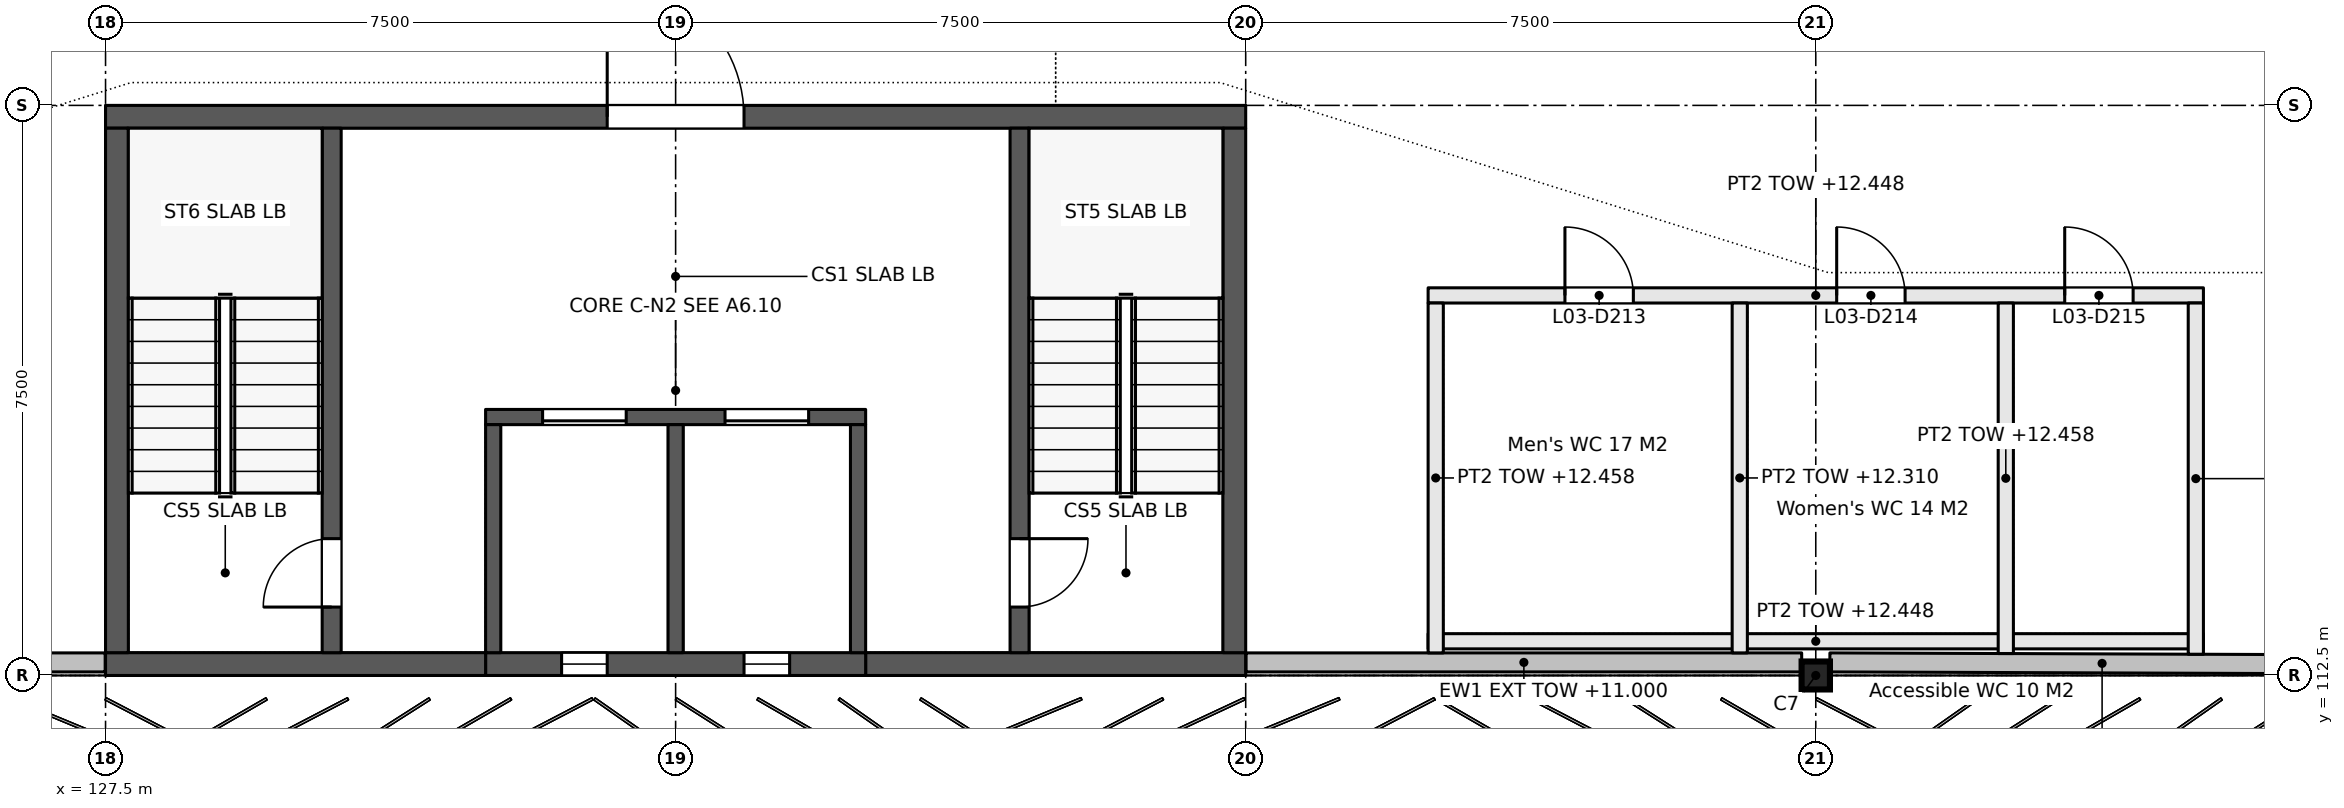
"""IFC4 building model, lengths in metres.
Left out: names, types, materials, properties, quantities, classifications, styles, units other than length and angle.
Written with IfcOpenShell. Run it as: python <this file> out.ifc"""

import sys

from ifc_helpers import new_model, si_unit, direction, frame, frame_2d, origin, origin_2d, place, context, subcontext, project, spatial, rectangle, i_section, extrude, element, fill, save


model = new_model("IFC4")
c1 = context("Model", 3, precision=1e-05, world=origin(), true_north=direction((0.0, 1.0)))
c2 = subcontext(c1, "Body", "Model", "MODEL_VIEW")
j1 = project(units=[si_unit("LENGTHUNIT", "METRE"), si_unit("PLANEANGLEUNIT", "RADIAN")], contexts=[c1])
p1 = place(None, origin())
s1 = spatial("IfcSite", under=j1, at=p1, CompositionType="ELEMENT")
p2 = place(p1, origin())
s2 = spatial("IfcBuilding", under=s1, at=p2, CompositionType="ELEMENT")
p3 = place(p2, frame((0.0, 0.0, 9.9)))
s3 = spatial("IfcBuildingStorey", under=s2, at=p3, CompositionType="ELEMENT", Elevation=9.9)
p4 = place(p3, frame((150.0, 112.5, 0.0), z_axis=(0.0, 0.0, 1.0), x_axis=(1.0, 0.0, 0.0)))
e1 = element("IfcColumn", 1, at=p4, inside=s3, PredefinedType="COLUMN", context=c2, shape_type="SweptSolid", body=[
    extrude(i_section(OverallWidth=0.373, OverallDepth=0.368, WebThickness=0.015, FlangeThickness=0.024, FilletRadius=0.015, at=origin_2d()), origin(), (0.0, 0.0, 1.0), 3.3),
])
p5 = place(p3, frame((144.9, 112.95, 0.0), z_axis=(0.0, 0.0, 1.0), x_axis=(1.0, 0.0, 0.0)))
e2 = element("IfcWall", 2, at=p5, inside=s3, PredefinedType="PARTITIONING", context=c2, shape_type="SweptSolid", body=[
    extrude(rectangle(XDim=10.2, YDim=0.2, at=frame_2d((5.1, 0.0))), origin(), (0.0, 0.0, 1.0), 2.548),
])
p6 = place(p3, frame((144.9, 117.5, 0.0), z_axis=(0.0, 0.0, 1.0), x_axis=(1.0, 0.0, 0.0)))
e3 = element("IfcWall", 3, at=p6, inside=s3, PredefinedType="PARTITIONING", context=c2, shape_type="SweptSolid", body=[
    extrude(rectangle(XDim=10.2, YDim=0.2, at=frame_2d((5.1, 0.0))), origin(), (0.0, 0.0, 1.0), 2.548),
])
p7 = place(p6, frame((1.8, 0.0, 0.0)))
e4 = element("IfcOpeningElement", 4, at=p7, cuts=e3, PredefinedType="OPENING", context=c2, shape_type="SweptSolid", body=[
    extrude(rectangle(XDim=0.9, YDim=2.1, at=frame_2d((0.45, 1.05))), frame((0.0, 0.11, 0.0), z_axis=(0.0, -1.0, 0.0), x_axis=(1.0, 0.0, 0.0)), (0.0, 0.0, 1.0), 0.22),
])
p8 = place(p6, frame((5.375, 0.0, 0.0)))
e5 = element("IfcOpeningElement", 5, at=p8, cuts=e3, PredefinedType="OPENING", context=c2, shape_type="SweptSolid", body=[
    extrude(rectangle(XDim=0.9, YDim=2.1, at=frame_2d((0.45, 1.05))), frame((0.0, 0.11, 0.0), z_axis=(0.0, -1.0, 0.0), x_axis=(1.0, 0.0, 0.0)), (0.0, 0.0, 1.0), 0.22),
])
p9 = place(p6, frame((8.375, 0.0, 0.0)))
e6 = element("IfcOpeningElement", 6, at=p9, cuts=e3, PredefinedType="OPENING", context=c2, shape_type="SweptSolid", body=[
    extrude(rectangle(XDim=0.9, YDim=2.1, at=frame_2d((0.45, 1.05))), frame((0.0, 0.11, 0.0), z_axis=(0.0, -1.0, 0.0), x_axis=(1.0, 0.0, 0.0)), (0.0, 0.0, 1.0), 0.22),
])
p10 = place(p3, frame((145.0, 112.797, 0.0), z_axis=(0.0, 0.0, 1.0), x_axis=(0.0, 1.0, 0.0)))
e7 = element("IfcWall", 7, at=p10, inside=s3, PredefinedType="PARTITIONING", context=c2, shape_type="SweptSolid", body=[
    extrude(rectangle(XDim=4.603, YDim=0.2, at=frame_2d((2.301, 0.0))), origin(), (0.0, 0.0, 1.0), 2.558),
])
p11 = place(p3, frame((149.0, 112.797, 0.0), z_axis=(0.0, 0.0, 1.0), x_axis=(0.0, 1.0, 0.0)))
e8 = element("IfcWall", 8, at=p11, inside=s3, PredefinedType="PARTITIONING", context=c2, shape_type="SweptSolid", body=[
    extrude(rectangle(XDim=4.603, YDim=0.2, at=frame_2d((2.301, 0.0))), origin(), (0.0, 0.0, 1.0), 2.41),
])
p12 = place(p3, frame((152.5, 112.789, 0.0), z_axis=(0.0, 0.0, 1.0), x_axis=(0.0, 1.0, 0.0)))
e9 = element("IfcWall", 9, at=p12, inside=s3, PredefinedType="PARTITIONING", context=c2, shape_type="SweptSolid", body=[
    extrude(rectangle(XDim=4.611, YDim=0.2, at=frame_2d((2.306, 0.0))), origin(), (0.0, 0.0, 1.0), 2.558),
])
p13 = place(p3, frame((155.0, 112.779, 0.0), z_axis=(0.0, 0.0, 1.0), x_axis=(0.0, 1.0, 0.0)))
e10 = element("IfcWall", 10, at=p13, inside=s3, PredefinedType="PARTITIONING", context=c2, shape_type="SweptSolid", body=[
    extrude(rectangle(XDim=4.621, YDim=0.2, at=frame_2d((2.31, 0.0))), origin(), (0.0, 0.0, 1.0), 2.558),
])
for number, where, z_axis, x_axis in (
    (11, (120.186, 112.672, 0.0), (0.0, 0.0, 1.0), (1.0, 0.0, 0.0)),
    (12, (142.505, 112.672, 0.0), (0.0, 0.0, 1.0), (1.0, 0.0, 0.0)),
):
    element("IfcWall", number, at=place(p3, frame(where, z_axis=z_axis, x_axis=x_axis)), inside=s3, PredefinedType="SOLIDWALL", context=c2, shape_type="SweptSolid", body=[
        extrude(rectangle(XDim=7.31, YDim=0.25, at=frame_2d((3.655, 0.0))), origin(), (0.0, 0.0, 1.0), 1.1),
    ])
p14 = place(p3, frame((150.186, 112.672, 0.0), z_axis=(0.0, 0.0, 1.0), x_axis=(0.999993224794, -0.003681082119, 0.0)))
e13 = element("IfcWall", 13, at=p14, inside=s3, PredefinedType="SOLIDWALL", context=c2, shape_type="SweptSolid", body=[
    extrude(rectangle(XDim=7.163, YDim=0.25, at=frame_2d((3.582, 0.0))), origin(), (0.0, 0.0, 1.0), 1.1),
])
p15 = place(p3, frame((127.5, 119.85, 0.0), z_axis=(0.0, 0.0, 1.0), x_axis=(1.0, 0.0, 0.0)))
e14 = element("IfcWall", 14, at=p15, inside=s3, PredefinedType="SHEAR", context=c2, shape_type="SweptSolid", body=[
    extrude(rectangle(XDim=15.0, YDim=0.3, at=frame_2d((7.5, 0.0))), origin(), (0.0, 0.0, 1.0), 3.3),
])
p16 = place(p15, frame((6.6, 0.0, 0.0)))
e15 = element("IfcOpeningElement", 15, at=p16, cuts=e14, PredefinedType="OPENING", context=c2, shape_type="SweptSolid", body=[
    extrude(rectangle(XDim=1.8, YDim=2.1, at=frame_2d((0.9, 1.05))), frame((0.0, 0.16, 0.0), z_axis=(0.0, -1.0, 0.0), x_axis=(1.0, 0.0, 0.0)), (0.0, 0.0, 1.0), 0.32),
])
p17 = place(p3, frame((142.5, 112.65, 0.0), z_axis=(0.0, 0.0, 1.0), x_axis=(-1.0, 0.0, 0.0)))
e16 = element("IfcWall", 16, at=p17, inside=s3, PredefinedType="SHEAR", context=c2, shape_type="SweptSolid", body=[
    extrude(rectangle(XDim=5.0, YDim=0.3, at=frame_2d((2.5, 0.0))), origin(), (0.0, 0.0, 1.0), 3.3),
])
p18 = place(p3, frame((137.5, 112.65, 0.0), z_axis=(0.0, 0.0, 1.0), x_axis=(-1.0, 0.0, 0.0)))
e17 = element("IfcWall", 17, at=p18, inside=s3, PredefinedType="SHEAR", context=c2, shape_type="SweptSolid", body=[
    extrude(rectangle(XDim=5.0, YDim=0.3, at=frame_2d((2.5, 0.0))), origin(), (0.0, 0.0, 1.0), 3.3),
])
p19 = place(p18, frame((1.0, 0.0, 0.3)))
e18 = element("IfcOpeningElement", 18, at=p19, cuts=e17, PredefinedType="OPENING", context=c2, shape_type="SweptSolid", body=[
    extrude(rectangle(XDim=0.6, YDim=2.7, at=frame_2d((0.3, 1.35))), frame((0.0, 0.16, 0.0), z_axis=(0.0, -1.0, 0.0), x_axis=(1.0, 0.0, 0.0)), (0.0, 0.0, 1.0), 0.32),
])
p20 = place(p18, frame((3.4, 0.0, 0.3)))
e19 = element("IfcOpeningElement", 19, at=p20, cuts=e17, PredefinedType="OPENING", context=c2, shape_type="SweptSolid", body=[
    extrude(rectangle(XDim=0.6, YDim=2.7, at=frame_2d((0.3, 1.35))), frame((0.0, 0.16, 0.0), z_axis=(0.0, -1.0, 0.0), x_axis=(1.0, 0.0, 0.0)), (0.0, 0.0, 1.0), 0.32),
])
p21 = place(p3, frame((132.5, 112.65, 0.0), z_axis=(0.0, 0.0, 1.0), x_axis=(-1.0, 0.0, 0.0)))
e20 = element("IfcWall", 20, at=p21, inside=s3, PredefinedType="SHEAR", context=c2, shape_type="SweptSolid", body=[
    extrude(rectangle(XDim=5.0, YDim=0.3, at=frame_2d((2.5, 0.0))), origin(), (0.0, 0.0, 1.0), 3.3),
])
for number, where, z_axis, x_axis in (
    (21, (142.35, 119.7, 0.0), (0.0, 0.0, 1.0), (0.0, -1.0, 0.0)),
    (22, (127.65, 119.7, 0.0), (0.0, 0.0, 1.0), (0.0, -1.0, 0.0)),
):
    element("IfcWall", number, at=place(p3, frame(where, z_axis=z_axis, x_axis=x_axis)), inside=s3, PredefinedType="SHEAR", context=c2, shape_type="SweptSolid", body=[
        extrude(rectangle(XDim=6.9, YDim=0.3, at=frame_2d((3.45, 0.0))), origin(), (0.0, 0.0, 1.0), 3.3),
    ])
p22 = place(p3, frame((139.525, 119.7, 0.0), z_axis=(0.0, 0.0, 1.0), x_axis=(0.0, -1.0, 0.0)))
e23 = element("IfcWall", 23, at=p22, inside=s3, PredefinedType="STANDARD", context=c2, shape_type="SweptSolid", body=[
    extrude(rectangle(XDim=6.9, YDim=0.25, at=frame_2d((3.45, 0.0))), origin(), (0.0, 0.0, 1.0), 3.1),
])
p23 = place(p22, frame((5.4, 0.0, 0.0)))
e24 = element("IfcOpeningElement", 24, at=p23, cuts=e23, PredefinedType="OPENING", context=c2, shape_type="SweptSolid", body=[
    extrude(rectangle(XDim=0.9, YDim=2.1, at=frame_2d((0.45, 1.05))), frame((0.0, 0.135, 0.0), z_axis=(0.0, -1.0, 0.0), x_axis=(1.0, 0.0, 0.0)), (0.0, 0.0, 1.0), 0.27),
])
p24 = place(p3, frame((130.475, 112.8, 0.0), z_axis=(0.0, 0.0, 1.0), x_axis=(0.0, 1.0, 0.0)))
e25 = element("IfcWall", 25, at=p24, inside=s3, PredefinedType="STANDARD", context=c2, shape_type="SweptSolid", body=[
    extrude(rectangle(XDim=6.9, YDim=0.25, at=frame_2d((3.45, 0.0))), origin(), (0.0, 0.0, 1.0), 3.1),
])
p25 = place(p24, frame((0.6, 0.0, 0.0)))
e26 = element("IfcOpeningElement", 26, at=p25, cuts=e25, PredefinedType="OPENING", context=c2, shape_type="SweptSolid", body=[
    extrude(rectangle(XDim=0.9, YDim=2.1, at=frame_2d((0.45, 1.05))), frame((0.0, 0.135, 0.0), z_axis=(0.0, -1.0, 0.0), x_axis=(1.0, 0.0, 0.0)), (0.0, 0.0, 1.0), 0.27),
])
p26 = place(p3, frame((137.5, 115.9, 0.0), z_axis=(0.0, 0.0, 1.0), x_axis=(-1.0, 0.0, 0.0)))
e27 = element("IfcWall", 27, at=p26, inside=s3, PredefinedType="STANDARD", context=c2, shape_type="SweptSolid", body=[
    extrude(rectangle(XDim=5.0, YDim=0.2, at=frame_2d((2.5, 0.0))), origin(), (0.0, 0.0, 1.0), 3.1),
])
p27 = place(p26, frame((0.75, 0.0, 0.0)))
e28 = element("IfcOpeningElement", 28, at=p27, cuts=e27, PredefinedType="OPENING", context=c2, shape_type="SweptSolid", body=[
    extrude(rectangle(XDim=1.1, YDim=2.1, at=frame_2d((0.55, 1.05))), frame((0.0, 0.11, 0.0), z_axis=(0.0, -1.0, 0.0), x_axis=(1.0, 0.0, 0.0)), (0.0, 0.0, 1.0), 0.22),
])
p28 = place(p26, frame((3.15, 0.0, 0.0)))
e29 = element("IfcOpeningElement", 29, at=p28, cuts=e27, PredefinedType="OPENING", context=c2, shape_type="SweptSolid", body=[
    extrude(rectangle(XDim=1.1, YDim=2.1, at=frame_2d((0.55, 1.05))), frame((0.0, 0.11, 0.0), z_axis=(0.0, -1.0, 0.0), x_axis=(1.0, 0.0, 0.0)), (0.0, 0.0, 1.0), 0.22),
])
for number, where, z_axis, x_axis in (
    (30, (137.4, 115.8, 0.0), (0.0, 0.0, 1.0), (0.0, -1.0, 0.0)),
    (31, (135.0, 115.8, 0.0), (0.0, 0.0, 1.0), (0.0, -1.0, 0.0)),
    (32, (132.6, 115.8, 0.0), (0.0, 0.0, 1.0), (0.0, -1.0, 0.0)),
):
    element("IfcWall", number, at=place(p3, frame(where, z_axis=z_axis, x_axis=x_axis)), inside=s3, PredefinedType="STANDARD", context=c2, shape_type="SweptSolid", body=[
        extrude(rectangle(XDim=3.0, YDim=0.2, at=frame_2d((1.5, 0.0))), origin(), (0.0, 0.0, 1.0), 3.1),
    ])
p29 = place(p7, origin())
e33 = element("IfcDoor", 33, at=p29, inside=s3, OperationType="SINGLE_SWING_LEFT", PredefinedType="DOOR", context=c2, shape_type="SweptSolid", body=[
    extrude(rectangle(XDim=0.9, YDim=2.1, at=frame_2d((0.45, 1.05))), frame((0.0, 0.025, 0.0), z_axis=(0.0, -1.0, 0.0), x_axis=(1.0, 0.0, 0.0)), (0.0, 0.0, 1.0), 0.05),
])
fill(e4, e33)
p30 = place(p8, origin())
e34 = element("IfcDoor", 34, at=p30, inside=s3, OperationType="SINGLE_SWING_RIGHT", PredefinedType="DOOR", context=c2, shape_type="SweptSolid", body=[
    extrude(rectangle(XDim=0.9, YDim=2.1, at=frame_2d((0.45, 1.05))), frame((0.0, 0.025, 0.0), z_axis=(0.0, -1.0, 0.0), x_axis=(1.0, 0.0, 0.0)), (0.0, 0.0, 1.0), 0.05),
])
fill(e5, e34)
p31 = place(p9, origin())
e35 = element("IfcDoor", 35, at=p31, inside=s3, OperationType="SINGLE_SWING_RIGHT", PredefinedType="DOOR", context=c2, shape_type="SweptSolid", body=[
    extrude(rectangle(XDim=0.9, YDim=2.1, at=frame_2d((0.45, 1.05))), frame((0.0, 0.025, 0.0), z_axis=(0.0, -1.0, 0.0), x_axis=(1.0, 0.0, 0.0)), (0.0, 0.0, 1.0), 0.05),
])
fill(e6, e35)
p32 = place(p16, origin())
e36 = element("IfcDoor", 36, at=p32, inside=s3, OperationType="DOUBLE_DOOR_SINGLE_SWING", PredefinedType="DOOR", context=c2, shape_type="SweptSolid", body=[
    extrude(rectangle(XDim=1.8, YDim=2.1, at=frame_2d((0.9, 1.05))), frame((0.0, 0.025, 0.0), z_axis=(0.0, -1.0, 0.0), x_axis=(1.0, 0.0, 0.0)), (0.0, 0.0, 1.0), 0.05),
])
fill(e15, e36)
p33 = place(p23, origin())
e37 = element("IfcDoor", 37, at=p33, inside=s3, OperationType="SINGLE_SWING_LEFT", PredefinedType="DOOR", context=c2, shape_type="SweptSolid", body=[
    extrude(rectangle(XDim=0.9, YDim=2.1, at=frame_2d((0.45, 1.05))), frame((0.0, 0.025, 0.0), z_axis=(0.0, -1.0, 0.0), x_axis=(1.0, 0.0, 0.0)), (0.0, 0.0, 1.0), 0.05),
])
fill(e24, e37)
p34 = place(p25, origin())
e38 = element("IfcDoor", 38, at=p34, inside=s3, OperationType="SINGLE_SWING_RIGHT", PredefinedType="DOOR", context=c2, shape_type="SweptSolid", body=[
    extrude(rectangle(XDim=0.9, YDim=2.1, at=frame_2d((0.45, 1.05))), frame((0.0, 0.025, 0.0), z_axis=(0.0, -1.0, 0.0), x_axis=(1.0, 0.0, 0.0)), (0.0, 0.0, 1.0), 0.05),
])
fill(e26, e38)
p35 = place(p27, origin())
e39 = element("IfcDoor", 39, at=p35, inside=s3, OperationType="DOUBLE_DOOR_SLIDING", PredefinedType="DOOR", context=c2, shape_type="SweptSolid", body=[
    extrude(rectangle(XDim=1.1, YDim=2.1, at=frame_2d((0.55, 1.05))), frame((0.0, 0.025, 0.0), z_axis=(0.0, -1.0, 0.0), x_axis=(1.0, 0.0, 0.0)), (0.0, 0.0, 1.0), 0.05),
])
fill(e28, e39)
p36 = place(p28, origin())
e40 = element("IfcDoor", 40, at=p36, inside=s3, OperationType="DOUBLE_DOOR_SLIDING", PredefinedType="DOOR", context=c2, shape_type="SweptSolid", body=[
    extrude(rectangle(XDim=1.1, YDim=2.1, at=frame_2d((0.55, 1.05))), frame((0.0, 0.025, 0.0), z_axis=(0.0, -1.0, 0.0), x_axis=(1.0, 0.0, 0.0)), (0.0, 0.0, 1.0), 0.05),
])
fill(e29, e40)
p37 = place(p19, origin())
e41 = element("IfcWindow", 41, at=p37, inside=s3, PartitioningType="SINGLE_PANEL", PredefinedType="WINDOW", context=c2, shape_type="SweptSolid", body=[
    extrude(rectangle(XDim=0.6, YDim=2.7, at=frame_2d((0.3, 1.35))), frame((0.0, 0.03, 0.0), z_axis=(0.0, -1.0, 0.0), x_axis=(1.0, 0.0, 0.0)), (0.0, 0.0, 1.0), 0.06),
])
fill(e18, e41)
p38 = place(p20, origin())
e42 = element("IfcWindow", 42, at=p38, inside=s3, PartitioningType="SINGLE_PANEL", PredefinedType="WINDOW", context=c2, shape_type="SweptSolid", body=[
    extrude(rectangle(XDim=0.6, YDim=2.7, at=frame_2d((0.3, 1.35))), frame((0.0, 0.03, 0.0), z_axis=(0.0, -1.0, 0.0), x_axis=(1.0, 0.0, 0.0)), (0.0, 0.0, 1.0), 0.06),
])
fill(e19, e42)
save(model, sys.argv[1])
